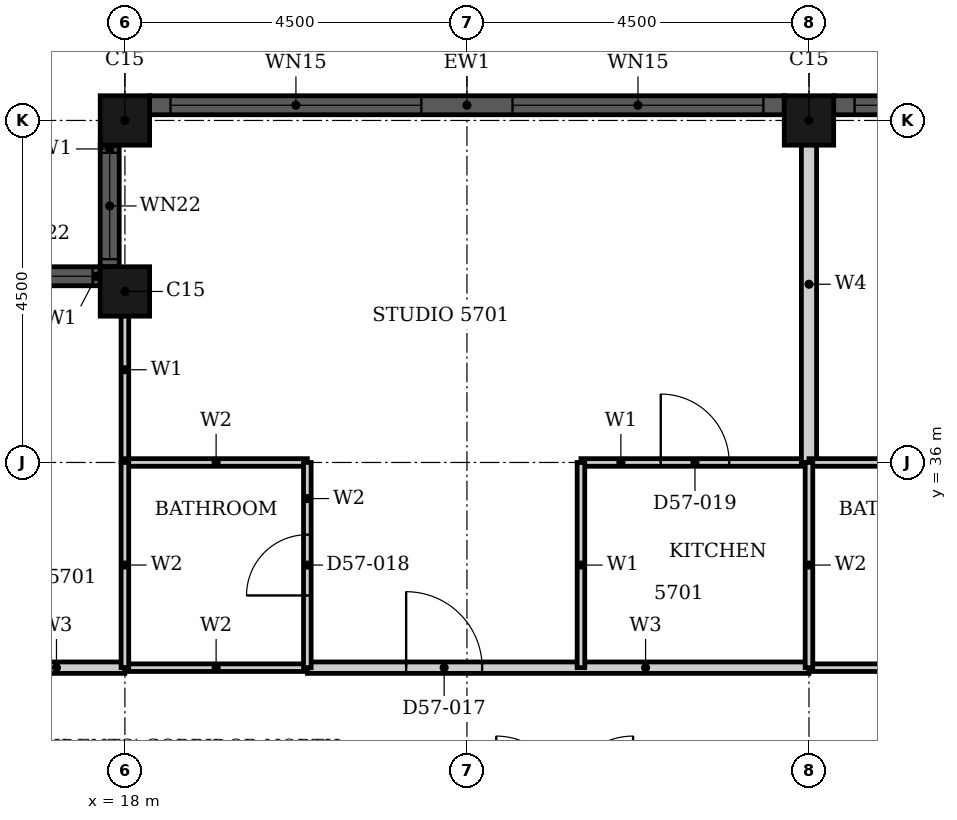
"""IFC4 building model, lengths in metres.
Left out: names, types, materials, properties, quantities, classifications, styles, units other than length and angle.
Written with IfcOpenShell. Run it as: python <this file> out.ifc"""

import sys

from ifc_helpers import new_model, si_unit, direction, frame, frame_2d, origin, origin_2d, place, context, subcontext, project, spatial, rectangle, hollow_rectangle, extrude, element, fill, save


model = new_model("IFC4")
c1 = context("Model", 3, precision=1e-05, world=origin(), true_north=direction((0.0, 1.0)))
c2 = subcontext(c1, "Body", "Model", "MODEL_VIEW")
j1 = project(units=[si_unit("LENGTHUNIT", "METRE"), si_unit("PLANEANGLEUNIT", "RADIAN")], contexts=[c1])
p1 = place(None, origin())
s1 = spatial("IfcSite", under=j1, at=p1, CompositionType="ELEMENT")
p2 = place(p1, origin())
s2 = spatial("IfcBuilding", under=s1, at=p2, CompositionType="ELEMENT")
p3 = place(p2, frame((0.0, 0.0, 225.7)))
s3 = spatial("IfcBuildingStorey", under=s2, at=p3, CompositionType="ELEMENT", Elevation=225.7)
for number, where, z_axis, x_axis in (
    (1, (27.0, 40.5, 0.0), (0.0, 0.0, 1.0), (1.0, 0.0, 0.0)),
    (2, (18.0, 40.5, 0.0), (0.0, 0.0, 1.0), (1.0, 0.0, 0.0)),
    (3, (18.0, 38.25, 0.0), (0.0, 0.0, 1.0), (1.0, 0.0, 0.0)),
):
    element("IfcColumn", number, at=place(p3, frame(where, z_axis=z_axis, x_axis=x_axis)), inside=s3, PredefinedType="COLUMN", context=c2, shape_type="SweptSolid", body=[
        extrude(hollow_rectangle(XDim=0.65, YDim=0.65, WallThickness=0.021, at=origin_2d()), origin(), (0.0, 0.0, 1.0), 3.7),
    ])
p4 = place(p3, frame((35.675, 40.7, 0.0), z_axis=(0.0, 0.0, 1.0), x_axis=(-1.0, 0.0, 0.0)))
e4 = element("IfcWall", 4, at=p4, inside=s3, PredefinedType="SOLIDWALL", context=c2, shape_type="SweptSolid", body=[
    extrude(rectangle(XDim=8.35, YDim=0.25, at=frame_2d((4.175, 0.0))), origin(), (0.0, 0.0, 1.0), 3.7),
])
p5 = place(p4, frame((0.275, 0.0, 0.45)))
e5 = element("IfcOpeningElement", 5, at=p5, cuts=e4, PredefinedType="OPENING", context=c2, shape_type="SweptSolid", body=[
    extrude(rectangle(XDim=3.3, YDim=2.3, at=frame_2d((1.65, 1.15))), frame((0.0, 0.135, 0.0), z_axis=(0.0, -1.0, 0.0), x_axis=(1.0, 0.0, 0.0)), (0.0, 0.0, 1.0), 0.27),
])
p6 = place(p4, frame((4.775, 0.0, 0.45)))
e6 = element("IfcOpeningElement", 6, at=p6, cuts=e4, PredefinedType="OPENING", context=c2, shape_type="SweptSolid", body=[
    extrude(rectangle(XDim=3.3, YDim=2.3, at=frame_2d((1.65, 1.15))), frame((0.0, 0.135, 0.0), z_axis=(0.0, -1.0, 0.0), x_axis=(1.0, 0.0, 0.0)), (0.0, 0.0, 1.0), 0.27),
])
p7 = place(p3, frame((26.675, 40.7, 0.0), z_axis=(0.0, 0.0, 1.0), x_axis=(-1.0, 0.0, 0.0)))
e7 = element("IfcWall", 7, at=p7, inside=s3, PredefinedType="SOLIDWALL", context=c2, shape_type="SweptSolid", body=[
    extrude(rectangle(XDim=8.35, YDim=0.25, at=frame_2d((4.175, 0.0))), origin(), (0.0, 0.0, 1.0), 3.7),
])
p8 = place(p7, frame((0.275, 0.0, 0.45)))
e8 = element("IfcOpeningElement", 8, at=p8, cuts=e7, PredefinedType="OPENING", context=c2, shape_type="SweptSolid", body=[
    extrude(rectangle(XDim=3.3, YDim=2.3, at=frame_2d((1.65, 1.15))), frame((0.0, 0.135, 0.0), z_axis=(0.0, -1.0, 0.0), x_axis=(1.0, 0.0, 0.0)), (0.0, 0.0, 1.0), 0.27),
])
p9 = place(p7, frame((4.775, 0.0, 0.45)))
e9 = element("IfcOpeningElement", 9, at=p9, cuts=e7, PredefinedType="OPENING", context=c2, shape_type="SweptSolid", body=[
    extrude(rectangle(XDim=3.3, YDim=2.3, at=frame_2d((1.65, 1.15))), frame((0.0, 0.135, 0.0), z_axis=(0.0, -1.0, 0.0), x_axis=(1.0, 0.0, 0.0)), (0.0, 0.0, 1.0), 0.27),
])
p10 = place(p3, frame((17.8, 40.175, 0.0), z_axis=(0.0, 0.0, 1.0), x_axis=(0.0, -1.0, 0.0)))
e10 = element("IfcWall", 10, at=p10, inside=s3, PredefinedType="SOLIDWALL", context=c2, shape_type="SweptSolid", body=[
    extrude(rectangle(XDim=1.6, YDim=0.25, at=frame_2d((0.8, 0.0))), origin(), (0.0, 0.0, 1.0), 3.7),
])
p11 = place(p10, frame((0.1, 0.0, 0.9)))
e11 = element("IfcOpeningElement", 11, at=p11, cuts=e10, PredefinedType="OPENING", context=c2, shape_type="SweptSolid", body=[
    extrude(rectangle(XDim=1.4, YDim=1.85, at=frame_2d((0.7, 0.925))), frame((0.0, 0.135, 0.0), z_axis=(0.0, -1.0, 0.0), x_axis=(1.0, 0.0, 0.0)), (0.0, 0.0, 1.0), 0.27),
])
p12 = place(p3, frame((17.675, 38.45, 0.0), z_axis=(0.0, 0.0, 1.0), x_axis=(-1.0, 0.0, 0.0)))
e12 = element("IfcWall", 12, at=p12, inside=s3, PredefinedType="SOLIDWALL", context=c2, shape_type="SweptSolid", body=[
    extrude(rectangle(XDim=1.6, YDim=0.25, at=frame_2d((0.8, 0.0))), origin(), (0.0, 0.0, 1.0), 3.7),
])
p13 = place(p12, frame((0.1, 0.0, 0.9)))
e13 = element("IfcOpeningElement", 13, at=p13, cuts=e12, PredefinedType="OPENING", context=c2, shape_type="SweptSolid", body=[
    extrude(rectangle(XDim=1.4, YDim=1.85, at=frame_2d((0.7, 0.925))), frame((0.0, 0.135, 0.0), z_axis=(0.0, -1.0, 0.0), x_axis=(1.0, 0.0, 0.0)), (0.0, 0.0, 1.0), 0.27),
])
p14 = place(p3, frame((20.4, 33.3, 0.0), z_axis=(0.0, 0.0, 1.0), x_axis=(1.0, 0.0, 0.0)))
e14 = element("IfcWall", 14, at=p14, inside=s3, PredefinedType="PARTITIONING", context=c2, shape_type="SweptSolid", body=[
    extrude(rectangle(XDim=6.6, YDim=0.15, at=frame_2d((3.3, 0.0))), origin(), (0.0, 0.0, 1.0), 3.4),
])
p15 = place(p14, frame((1.3, 0.0, 0.0)))
e15 = element("IfcOpeningElement", 15, at=p15, cuts=e14, PredefinedType="OPENING", context=c2, shape_type="SweptSolid", body=[
    extrude(rectangle(XDim=1.0, YDim=2.2, at=frame_2d((0.5, 1.1))), frame((0.0, 0.085, 0.0), z_axis=(0.0, -1.0, 0.0), x_axis=(1.0, 0.0, 0.0)), (0.0, 0.0, 1.0), 0.17),
])
p16 = place(p3, frame((16.2, 33.3, 0.0), z_axis=(0.0, 0.0, 1.0), x_axis=(1.0, 0.0, 0.0)))
e16 = element("IfcWall", 16, at=p16, inside=s3, PredefinedType="PARTITIONING", context=c2, shape_type="SweptSolid", body=[
    extrude(rectangle(XDim=1.799, YDim=0.15, at=frame_2d((0.899, 0.0))), origin(), (0.0, 0.0, 1.0), 3.4),
])
p17 = place(p3, frame((24.0, 36.0, 0.0), z_axis=(0.0, 0.0, 1.0), x_axis=(1.0, 0.0, 0.0)))
e17 = element("IfcWall", 17, at=p17, inside=s3, PredefinedType="PARTITIONING", context=c2, shape_type="SweptSolid", body=[
    extrude(rectangle(XDim=3.0, YDim=0.1, at=frame_2d((1.5, 0.0))), origin(), (0.0, 0.0, 1.0), 3.4),
])
p18 = place(p17, frame((1.05, 0.0, 0.0)))
e18 = element("IfcOpeningElement", 18, at=p18, cuts=e17, PredefinedType="OPENING", context=c2, shape_type="SweptSolid", body=[
    extrude(rectangle(XDim=0.9, YDim=2.1, at=frame_2d((0.45, 1.05))), frame((0.0, 0.06, 0.0), z_axis=(0.0, -1.0, 0.0), x_axis=(1.0, 0.0, 0.0)), (0.0, 0.0, 1.0), 0.12),
])
p19 = place(p3, frame((18.0, 36.0, 0.0), z_axis=(0.0, 0.0, 1.0), x_axis=(0.0, 1.0, 0.0)))
e19 = element("IfcWall", 19, at=p19, inside=s3, PredefinedType="PARTITIONING", context=c2, shape_type="SweptSolid", body=[
    extrude(rectangle(XDim=2.44, YDim=0.1, at=frame_2d((1.22, 0.0))), origin(), (0.0, 0.0, 1.0), 3.4),
])
p20 = place(p3, frame((24.0, 33.3, 0.0), z_axis=(0.0, 0.0, 1.0), x_axis=(0.0, 1.0, 0.0)))
e20 = element("IfcWall", 20, at=p20, inside=s3, PredefinedType="PARTITIONING", context=c2, shape_type="SweptSolid", body=[
    extrude(rectangle(XDim=2.7, YDim=0.1, at=frame_2d((1.35, 0.0))), origin(), (0.0, 0.0, 1.0), 3.4),
])
p21 = place(p3, frame((27.0, 36.0, 0.0), z_axis=(0.0, 0.0, 1.0), x_axis=(0.0, 1.0, 0.0)))
e21 = element("IfcWall", 21, at=p21, inside=s3, PredefinedType="PARTITIONING", context=c2, shape_type="SweptSolid", body=[
    extrude(rectangle(XDim=4.69, YDim=0.2, at=frame_2d((2.345, 0.0))), origin(), (0.0, 0.0, 1.0), 3.4),
])
for number, where, z_axis, x_axis in (
    (22, (18.0, 33.3, 0.0), (0.0, 0.0, 1.0), (1.0, 0.0, 0.0)),
    (23, (27.0, 33.3, 0.0), (0.0, 0.0, 1.0), (1.0, 0.0, 0.0)),
    (24, (18.0, 36.0, 0.0), (0.0, 0.0, 1.0), (1.0, 0.0, 0.0)),
    (25, (27.0, 36.0, 0.0), (0.0, 0.0, 1.0), (1.0, 0.0, 0.0)),
):
    element("IfcWall", number, at=place(p3, frame(where, z_axis=z_axis, x_axis=x_axis)), inside=s3, PredefinedType="PARTITIONING", context=c2, shape_type="SweptSolid", body=[
        extrude(rectangle(XDim=2.4, YDim=0.1, at=frame_2d((1.2, 0.0))), origin(), (0.0, 0.0, 1.0), 3.4),
    ])
p22 = place(p3, frame((18.0, 33.301, 0.0), z_axis=(0.0, 0.0, 1.0), x_axis=(0.0, 1.0, 0.0)))
e26 = element("IfcWall", 26, at=p22, inside=s3, PredefinedType="PARTITIONING", context=c2, shape_type="SweptSolid", body=[
    extrude(rectangle(XDim=2.699, YDim=0.1, at=frame_2d((1.35, 0.0))), origin(), (0.0, 0.0, 1.0), 3.4),
])
p23 = place(p3, frame((20.4, 33.3, 0.0), z_axis=(0.0, 0.0, 1.0), x_axis=(0.0, 1.0, 0.0)))
e27 = element("IfcWall", 27, at=p23, inside=s3, PredefinedType="PARTITIONING", context=c2, shape_type="SweptSolid", body=[
    extrude(rectangle(XDim=2.7, YDim=0.1, at=frame_2d((1.35, 0.0))), origin(), (0.0, 0.0, 1.0), 3.4),
])
p24 = place(p23, frame((0.95, 0.0, 0.0)))
e28 = element("IfcOpeningElement", 28, at=p24, cuts=e27, PredefinedType="OPENING", context=c2, shape_type="SweptSolid", body=[
    extrude(rectangle(XDim=0.8, YDim=2.1, at=frame_2d((0.4, 1.05))), frame((0.0, 0.06, 0.0), z_axis=(0.0, -1.0, 0.0), x_axis=(1.0, 0.0, 0.0)), (0.0, 0.0, 1.0), 0.12),
])
p25 = place(p3, frame((27.0, 33.3, 0.0), z_axis=(0.0, 0.0, 1.0), x_axis=(0.0, 1.0, 0.0)))
e29 = element("IfcWall", 29, at=p25, inside=s3, PredefinedType="PARTITIONING", context=c2, shape_type="SweptSolid", body=[
    extrude(rectangle(XDim=2.7, YDim=0.1, at=frame_2d((1.35, 0.0))), origin(), (0.0, 0.0, 1.0), 3.4),
])
p26 = place(p6, origin())
e30 = element("IfcWindow", 30, at=p26, inside=s3, PartitioningType="SINGLE_PANEL", PredefinedType="WINDOW", context=c2, shape_type="SweptSolid", body=[
    extrude(rectangle(XDim=3.3, YDim=2.3, at=frame_2d((1.65, 1.15))), frame((0.0, 0.03, 0.0), z_axis=(0.0, -1.0, 0.0), x_axis=(1.0, 0.0, 0.0)), (0.0, 0.0, 1.0), 0.06),
])
fill(e6, e30)
p27 = place(p8, origin())
e31 = element("IfcWindow", 31, at=p27, inside=s3, PartitioningType="SINGLE_PANEL", PredefinedType="WINDOW", context=c2, shape_type="SweptSolid", body=[
    extrude(rectangle(XDim=3.3, YDim=2.3, at=frame_2d((1.65, 1.15))), frame((0.0, 0.03, 0.0), z_axis=(0.0, -1.0, 0.0), x_axis=(1.0, 0.0, 0.0)), (0.0, 0.0, 1.0), 0.06),
])
fill(e8, e31)
p28 = place(p9, origin())
e32 = element("IfcWindow", 32, at=p28, inside=s3, PartitioningType="SINGLE_PANEL", PredefinedType="WINDOW", context=c2, shape_type="SweptSolid", body=[
    extrude(rectangle(XDim=3.3, YDim=2.3, at=frame_2d((1.65, 1.15))), frame((0.0, 0.03, 0.0), z_axis=(0.0, -1.0, 0.0), x_axis=(1.0, 0.0, 0.0)), (0.0, 0.0, 1.0), 0.06),
])
fill(e9, e32)
p29 = place(p11, origin())
e33 = element("IfcWindow", 33, at=p29, inside=s3, PartitioningType="SINGLE_PANEL", PredefinedType="WINDOW", context=c2, shape_type="SweptSolid", body=[
    extrude(rectangle(XDim=1.4, YDim=1.85, at=frame_2d((0.7, 0.925))), frame((0.0, 0.03, 0.0), z_axis=(0.0, -1.0, 0.0), x_axis=(1.0, 0.0, 0.0)), (0.0, 0.0, 1.0), 0.06),
])
fill(e11, e33)
p30 = place(p13, origin())
e34 = element("IfcWindow", 34, at=p30, inside=s3, PartitioningType="SINGLE_PANEL", PredefinedType="WINDOW", context=c2, shape_type="SweptSolid", body=[
    extrude(rectangle(XDim=1.4, YDim=1.85, at=frame_2d((0.7, 0.925))), frame((0.0, 0.03, 0.0), z_axis=(0.0, -1.0, 0.0), x_axis=(1.0, 0.0, 0.0)), (0.0, 0.0, 1.0), 0.06),
])
fill(e13, e34)
p31 = place(p15, origin())
e35 = element("IfcDoor", 35, at=p31, inside=s3, OperationType="SINGLE_SWING_RIGHT", PredefinedType="DOOR", context=c2, shape_type="SweptSolid", body=[
    extrude(rectangle(XDim=1.0, YDim=2.2, at=frame_2d((0.5, 1.1))), frame((0.0, 0.025, 0.0), z_axis=(0.0, -1.0, 0.0), x_axis=(1.0, 0.0, 0.0)), (0.0, 0.0, 1.0), 0.05),
])
fill(e15, e35)
p32 = place(p24, origin())
e36 = element("IfcDoor", 36, at=p32, inside=s3, OperationType="SINGLE_SWING_RIGHT", PredefinedType="DOOR", context=c2, shape_type="SweptSolid", body=[
    extrude(rectangle(XDim=0.8, YDim=2.1, at=frame_2d((0.4, 1.05))), frame((0.0, 0.025, 0.0), z_axis=(0.0, -1.0, 0.0), x_axis=(1.0, 0.0, 0.0)), (0.0, 0.0, 1.0), 0.05),
])
fill(e28, e36)
p33 = place(p18, origin())
e37 = element("IfcDoor", 37, at=p33, inside=s3, OperationType="SINGLE_SWING_LEFT", PredefinedType="DOOR", context=c2, shape_type="SweptSolid", body=[
    extrude(rectangle(XDim=0.9, YDim=2.1, at=frame_2d((0.45, 1.05))), frame((0.0, 0.025, 0.0), z_axis=(0.0, -1.0, 0.0), x_axis=(1.0, 0.0, 0.0)), (0.0, 0.0, 1.0), 0.05),
])
fill(e18, e37)
save(model, sys.argv[1])
